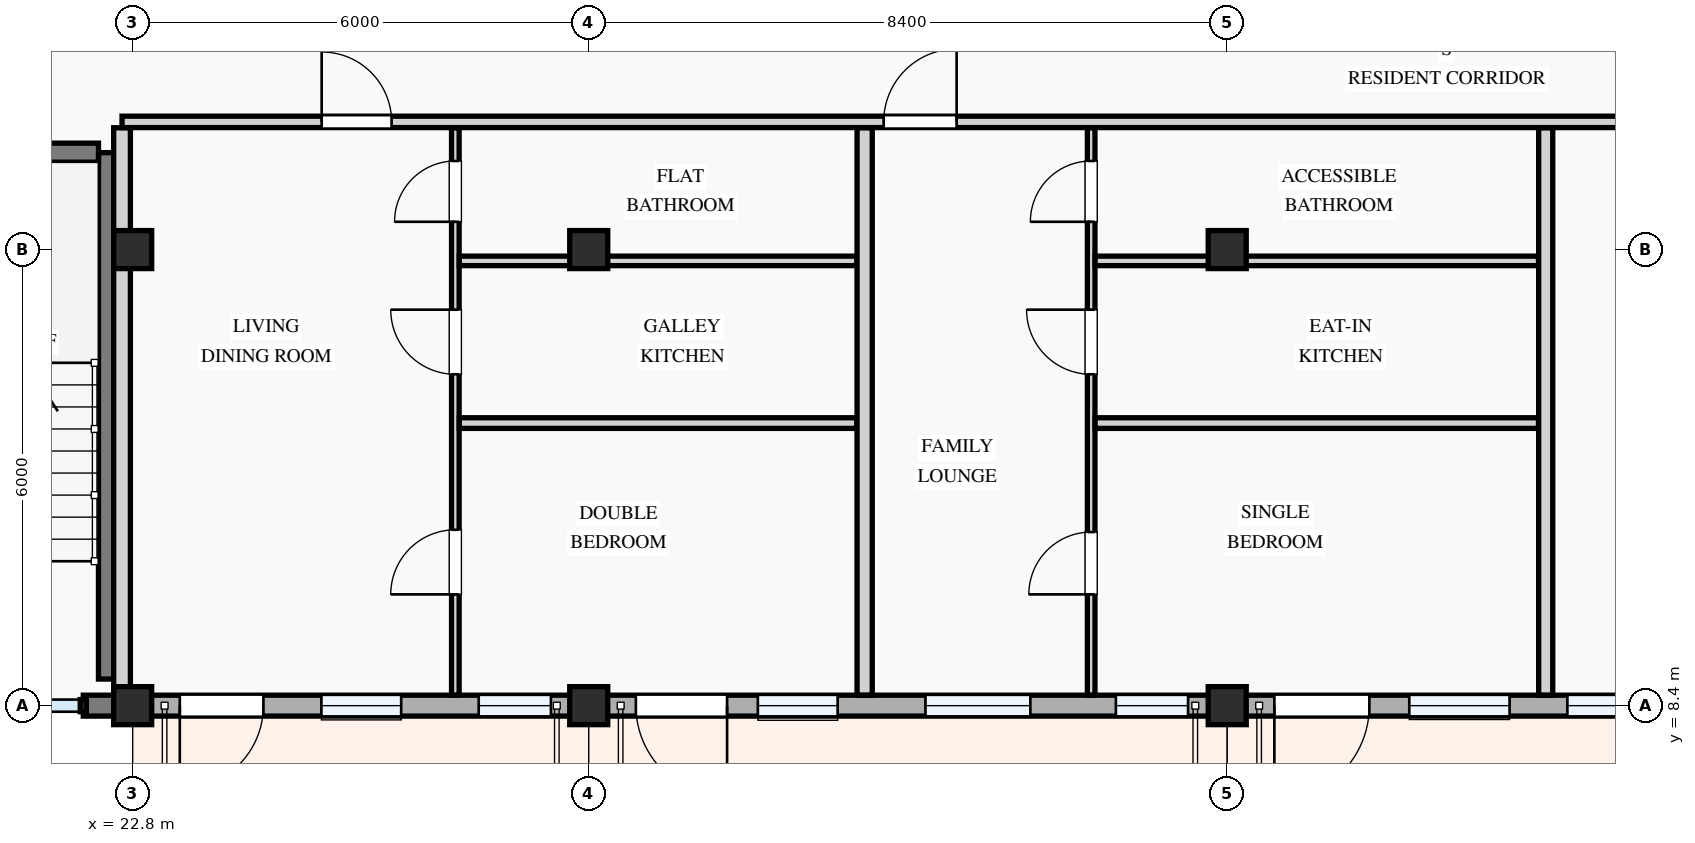
"""IFC4 building model, lengths in metres.
Left out: names, types, materials, properties, quantities, classifications, styles, units other than length and angle.
Written with IfcOpenShell. Run it as: python <this file> out.ifc"""

import sys

from ifc_helpers import new_model, si_unit, direction, frame, frame_2d, origin, origin_2d, place, context, subcontext, project, spatial, rectangle, extrude, element, fill, save


model = new_model("IFC4")
c1 = context("Model", 3, precision=1e-05, world=origin(), true_north=direction((0.0, 1.0)))
c2 = subcontext(c1, "Body", "Model", "MODEL_VIEW")
j1 = project(units=[si_unit("LENGTHUNIT", "METRE"), si_unit("PLANEANGLEUNIT", "RADIAN")], contexts=[c1])
p1 = place(None, origin())
s1 = spatial("IfcSite", under=j1, at=p1, CompositionType="ELEMENT")
p2 = place(p1, origin())
s2 = spatial("IfcBuilding", under=s1, at=p2, CompositionType="ELEMENT")
p3 = place(p2, frame((0.0, 0.0, 24.6)))
s3 = spatial("IfcBuildingStorey", under=s2, at=p3, CompositionType="ELEMENT", Elevation=24.6)
for number, where, z_axis, x_axis in (
    (1, (22.8, 8.4, 0.0), (0.0, 0.0, 1.0), (1.0, 0.0, 0.0)),
    (2, (22.8, 14.4, 0.0), (0.0, 0.0, 1.0), (1.0, 0.0, 0.0)),
    (3, (28.8, 8.4, 0.0), (0.0, 0.0, 1.0), (1.0, 0.0, 0.0)),
    (4, (28.8, 14.4, 0.0), (0.0, 0.0, 1.0), (1.0, 0.0, 0.0)),
    (5, (37.2, 8.4, 0.0), (0.0, 0.0, 1.0), (1.0, 0.0, 0.0)),
    (6, (37.2, 14.4, 0.0), (0.0, 0.0, 1.0), (1.0, 0.0, 0.0)),
):
    element("IfcColumn", number, at=place(p3, frame(where, z_axis=z_axis, x_axis=x_axis)), inside=s3, PredefinedType="COLUMN", context=c2, shape_type="SweptSolid", body=[
        extrude(rectangle(XDim=0.5, YDim=0.5, at=origin_2d()), origin(), (0.0, 0.0, 1.0), 3.3),
    ])
p4 = place(p3, frame((22.15, 8.4, 0.0), z_axis=(0.0, 0.0, 1.0), x_axis=(1.0, 0.0, 0.0)))
e7 = element("IfcWall", 7, at=p4, inside=s3, PredefinedType="STANDARD", context=c2, shape_type="SweptSolid", body=[
    extrude(rectangle(XDim=0.65, YDim=0.275, at=frame_2d((0.325, 0.0))), origin(), (0.0, 0.0, 1.0), 3.04),
])
p5 = place(p3, frame((22.8, 8.4, 0.0), z_axis=(0.0, 0.0, 1.0), x_axis=(1.0, 0.0, 0.0)))
e8 = element("IfcWall", 8, at=p5, inside=s3, PredefinedType="STANDARD", context=c2, shape_type="SweptSolid", body=[
    extrude(rectangle(XDim=6.0, YDim=0.275, at=frame_2d((3.0, 0.0))), origin(), (0.0, 0.0, 1.0), 2.475),
])
p6 = place(p5, frame((0.62, 0.0, 0.0)))
e9 = element("IfcOpeningElement", 9, at=p6, cuts=e8, PredefinedType="OPENING", context=c2, shape_type="SweptSolid", body=[
    extrude(rectangle(XDim=1.1, YDim=2.15, at=frame_2d((0.55, 1.075))), frame((0.0, 0.147, 0.0), z_axis=(0.0, -1.0, 0.0), x_axis=(1.0, 0.0, 0.0)), (0.0, 0.0, 1.0), 0.295),
])
p7 = place(p5, frame((2.482, 0.0, 0.78)))
e10 = element("IfcOpeningElement", 10, at=p7, cuts=e8, PredefinedType="OPENING", context=c2, shape_type="SweptSolid", body=[
    extrude(rectangle(XDim=1.05, YDim=1.2, at=frame_2d((0.525, 0.6))), frame((0.0, 0.147, 0.0), z_axis=(0.0, -1.0, 0.0), x_axis=(1.0, 0.0, 0.0)), (0.0, 0.0, 1.0), 0.295),
])
p8 = place(p5, frame((4.552, 0.0, 0.78)))
e11 = element("IfcOpeningElement", 11, at=p8, cuts=e8, PredefinedType="OPENING", context=c2, shape_type="SweptSolid", body=[
    extrude(rectangle(XDim=0.95, YDim=1.15, at=frame_2d((0.475, 0.575))), frame((0.0, 0.147, 0.0), z_axis=(0.0, -1.0, 0.0), x_axis=(1.0, 0.0, 0.0)), (0.0, 0.0, 1.0), 0.295),
])
p9 = place(p3, frame((28.8, 8.4, 0.0), z_axis=(0.0, 0.0, 1.0), x_axis=(1.0, 0.0, 0.0)))
e12 = element("IfcWall", 12, at=p9, inside=s3, PredefinedType="STANDARD", context=c2, shape_type="SweptSolid", body=[
    extrude(rectangle(XDim=8.4, YDim=0.275, at=frame_2d((4.2, 0.0))), origin(), (0.0, 0.0, 1.0), 2.375),
])
p10 = place(p9, frame((0.62, 0.0, 0.0)))
e13 = element("IfcOpeningElement", 13, at=p10, cuts=e12, PredefinedType="OPENING", context=c2, shape_type="SweptSolid", body=[
    extrude(rectangle(XDim=1.2, YDim=2.15, at=frame_2d((0.6, 1.075))), frame((0.0, 0.147, 0.0), z_axis=(0.0, -1.0, 0.0), x_axis=(1.0, 0.0, 0.0)), (0.0, 0.0, 1.0), 0.295),
])
p11 = place(p9, frame((2.225, 0.0, 0.78)))
e14 = element("IfcOpeningElement", 14, at=p11, cuts=e12, PredefinedType="OPENING", context=c2, shape_type="SweptSolid", body=[
    extrude(rectangle(XDim=1.05, YDim=1.2, at=frame_2d((0.525, 0.6))), frame((0.0, 0.147, 0.0), z_axis=(0.0, -1.0, 0.0), x_axis=(1.0, 0.0, 0.0)), (0.0, 0.0, 1.0), 0.295),
])
p12 = place(p9, frame((4.43, 0.0, 0.78)))
e15 = element("IfcOpeningElement", 15, at=p12, cuts=e12, PredefinedType="OPENING", context=c2, shape_type="SweptSolid", body=[
    extrude(rectangle(XDim=1.38, YDim=1.48, at=frame_2d((0.69, 0.74))), frame((0.0, 0.147, 0.0), z_axis=(0.0, -1.0, 0.0), x_axis=(1.0, 0.0, 0.0)), (0.0, 0.0, 1.0), 0.295),
])
p13 = place(p9, frame((6.935, 0.0, 0.78)))
e16 = element("IfcOpeningElement", 16, at=p13, cuts=e12, PredefinedType="OPENING", context=c2, shape_type="SweptSolid", body=[
    extrude(rectangle(XDim=0.95, YDim=1.15, at=frame_2d((0.475, 0.575))), frame((0.0, 0.147, 0.0), z_axis=(0.0, -1.0, 0.0), x_axis=(1.0, 0.0, 0.0)), (0.0, 0.0, 1.0), 0.295),
])
p14 = place(p3, frame((37.2, 8.4, 0.0), z_axis=(0.0, 0.0, 1.0), x_axis=(1.0, 0.0, 0.0)))
e17 = element("IfcWall", 17, at=p14, inside=s3, PredefinedType="STANDARD", context=c2, shape_type="SweptSolid", body=[
    extrude(rectangle(XDim=6.0, YDim=0.275, at=frame_2d((3.0, 0.0))), origin(), (0.0, 0.0, 1.0), 2.475),
])
p15 = place(p14, frame((0.62, 0.0, 0.0)))
e18 = element("IfcOpeningElement", 18, at=p15, cuts=e17, PredefinedType="OPENING", context=c2, shape_type="SweptSolid", body=[
    extrude(rectangle(XDim=1.25, YDim=2.2, at=frame_2d((0.625, 1.1))), frame((0.0, 0.147, 0.0), z_axis=(0.0, -1.0, 0.0), x_axis=(1.0, 0.0, 0.0)), (0.0, 0.0, 1.0), 0.295),
])
p16 = place(p14, frame((2.395, 0.0, 0.78)))
e19 = element("IfcOpeningElement", 19, at=p16, cuts=e17, PredefinedType="OPENING", context=c2, shape_type="SweptSolid", body=[
    extrude(rectangle(XDim=1.32, YDim=1.35, at=frame_2d((0.66, 0.675))), frame((0.0, 0.147, 0.0), z_axis=(0.0, -1.0, 0.0), x_axis=(1.0, 0.0, 0.0)), (0.0, 0.0, 1.0), 0.295),
])
p17 = place(p14, frame((4.475, 0.0, 0.78)))
e20 = element("IfcOpeningElement", 20, at=p17, cuts=e17, PredefinedType="OPENING", context=c2, shape_type="SweptSolid", body=[
    extrude(rectangle(XDim=1.05, YDim=1.2, at=frame_2d((0.525, 0.6))), frame((0.0, 0.147, 0.0), z_axis=(0.0, -1.0, 0.0), x_axis=(1.0, 0.0, 0.0)), (0.0, 0.0, 1.0), 0.295),
])
p18 = place(p3, frame((22.475, 8.75, 0.0), z_axis=(0.0, 0.0, 1.0), x_axis=(0.0, 1.0, 0.0)))
e21 = element("IfcWall", 21, at=p18, inside=s3, PredefinedType="SHEAR", context=c2, shape_type="SweptSolid", body=[
    extrude(rectangle(XDim=6.925, YDim=0.25, at=frame_2d((3.462, 0.0))), origin(), (0.0, 0.0, 1.0), 3.0),
])
p19 = place(p3, frame((8.85, 15.675, 0.0), z_axis=(0.0, 0.0, 1.0), x_axis=(1.0, 0.0, 0.0)))
e22 = element("IfcWall", 22, at=p19, inside=s3, PredefinedType="SHEAR", context=c2, shape_type="SweptSolid", body=[
    extrude(rectangle(XDim=13.5, YDim=0.25, at=frame_2d((6.75, 0.0))), origin(), (0.0, 0.0, 1.0), 3.0),
])
p20 = place(p19, frame((6.2, 0.0, 0.0)))
e23 = element("IfcOpeningElement", 23, at=p20, cuts=e22, PredefinedType="OPENING", context=c2, shape_type="SweptSolid", body=[
    extrude(rectangle(XDim=1.1, YDim=2.15, at=frame_2d((0.55, 1.075))), frame((0.0, 0.135, 0.0), z_axis=(0.0, -1.0, 0.0), x_axis=(1.0, 0.0, 0.0)), (0.0, 0.0, 1.0), 0.27),
])
p21 = place(p3, frame((27.045, 8.54, 0.0), z_axis=(0.0, 0.0, 1.0), x_axis=(0.0, 1.0, 0.0)))
e24 = element("IfcWall", 24, at=p21, inside=s3, PredefinedType="PARTITIONING", context=c2, shape_type="SweptSolid", body=[
    extrude(rectangle(XDim=7.463, YDim=0.1, at=frame_2d((3.732, 0.0))), origin(), (0.0, 0.0, 1.0), 3.0),
])
p22 = place(p21, frame((1.324, 0.0, 0.0)))
e25 = element("IfcOpeningElement", 25, at=p22, cuts=e24, PredefinedType="OPENING", context=c2, shape_type="SweptSolid", body=[
    extrude(rectangle(XDim=0.85, YDim=2.1, at=frame_2d((0.425, 1.05))), frame((0.0, 0.06, 0.0), z_axis=(0.0, -1.0, 0.0), x_axis=(1.0, 0.0, 0.0)), (0.0, 0.0, 1.0), 0.12),
])
p23 = place(p21, frame((4.22, 0.0, 0.0)))
e26 = element("IfcOpeningElement", 26, at=p23, cuts=e24, PredefinedType="OPENING", context=c2, shape_type="SweptSolid", body=[
    extrude(rectangle(XDim=0.85, YDim=2.1, at=frame_2d((0.425, 1.05))), frame((0.0, 0.06, 0.0), z_axis=(0.0, -1.0, 0.0), x_axis=(1.0, 0.0, 0.0)), (0.0, 0.0, 1.0), 0.12),
])
p24 = place(p21, frame((6.226, 0.0, 0.0)))
e27 = element("IfcOpeningElement", 27, at=p24, cuts=e24, PredefinedType="OPENING", context=c2, shape_type="SweptSolid", body=[
    extrude(rectangle(XDim=0.8, YDim=2.1, at=frame_2d((0.4, 1.05))), frame((0.0, 0.06, 0.0), z_axis=(0.0, -1.0, 0.0), x_axis=(1.0, 0.0, 0.0)), (0.0, 0.0, 1.0), 0.12),
])
p25 = place(p3, frame((27.097, 12.118, 0.0), z_axis=(0.0, 0.0, 1.0), x_axis=(1.0, 0.0, 0.0)))
e28 = element("IfcWall", 28, at=p25, inside=s3, PredefinedType="PARTITIONING", context=c2, shape_type="SweptSolid", body=[
    extrude(rectangle(XDim=5.231, YDim=0.14, at=frame_2d((2.615, 0.0))), origin(), (0.0, 0.0, 1.0), 3.0),
])
p26 = place(p3, frame((27.097, 14.251, 0.0), z_axis=(0.0, 0.0, 1.0), x_axis=(1.0, 0.0, 0.0)))
e29 = element("IfcWall", 29, at=p26, inside=s3, PredefinedType="PARTITIONING", context=c2, shape_type="SweptSolid", body=[
    extrude(rectangle(XDim=5.231, YDim=0.125, at=frame_2d((2.615, 0.0))), origin(), (0.0, 0.0, 1.0), 2.375),
])
p27 = place(p3, frame((22.66, 8.54, 0.0), z_axis=(0.0, 0.0, 1.0), x_axis=(0.0, 1.0, 0.0)))
e30 = element("IfcWall", 30, at=p27, inside=s3, PredefinedType="PARTITIONING", context=c2, shape_type="SweptSolid", body=[
    extrude(rectangle(XDim=7.463, YDim=0.22, at=frame_2d((3.732, 0.0))), origin(), (0.0, 0.0, 1.0), 2.425),
])
p28 = place(p3, frame((35.41, 8.54, 0.0), z_axis=(0.0, 0.0, 1.0), x_axis=(0.0, 1.0, 0.0)))
e31 = element("IfcWall", 31, at=p28, inside=s3, PredefinedType="PARTITIONING", context=c2, shape_type="SweptSolid", body=[
    extrude(rectangle(XDim=7.463, YDim=0.1, at=frame_2d((3.732, 0.0))), origin(), (0.0, 0.0, 1.0), 3.0),
])
p29 = place(p28, frame((1.324, 0.0, 0.0)))
e32 = element("IfcOpeningElement", 32, at=p29, cuts=e31, PredefinedType="OPENING", context=c2, shape_type="SweptSolid", body=[
    extrude(rectangle(XDim=0.82, YDim=2.08, at=frame_2d((0.41, 1.04))), frame((0.0, 0.06, 0.0), z_axis=(0.0, -1.0, 0.0), x_axis=(1.0, 0.0, 0.0)), (0.0, 0.0, 1.0), 0.12),
])
p30 = place(p28, frame((4.22, 0.0, 0.0)))
e33 = element("IfcOpeningElement", 33, at=p30, cuts=e31, PredefinedType="OPENING", context=c2, shape_type="SweptSolid", body=[
    extrude(rectangle(XDim=0.85, YDim=2.1, at=frame_2d((0.425, 1.05))), frame((0.0, 0.06, 0.0), z_axis=(0.0, -1.0, 0.0), x_axis=(1.0, 0.0, 0.0)), (0.0, 0.0, 1.0), 0.12),
])
p31 = place(p28, frame((6.226, 0.0, 0.0)))
e34 = element("IfcOpeningElement", 34, at=p31, cuts=e31, PredefinedType="OPENING", context=c2, shape_type="SweptSolid", body=[
    extrude(rectangle(XDim=0.8, YDim=2.1, at=frame_2d((0.4, 1.05))), frame((0.0, 0.06, 0.0), z_axis=(0.0, -1.0, 0.0), x_axis=(1.0, 0.0, 0.0)), (0.0, 0.0, 1.0), 0.12),
])
p32 = place(p3, frame((35.462, 12.118, 0.0), z_axis=(0.0, 0.0, 1.0), x_axis=(1.0, 0.0, 0.0)))
e35 = element("IfcWall", 35, at=p32, inside=s3, PredefinedType="PARTITIONING", context=c2, shape_type="SweptSolid", body=[
    extrude(rectangle(XDim=5.833, YDim=0.14, at=frame_2d((2.917, 0.0))), origin(), (0.0, 0.0, 1.0), 3.0),
])
p33 = place(p3, frame((35.462, 14.251, 0.0), z_axis=(0.0, 0.0, 1.0), x_axis=(1.0, 0.0, 0.0)))
e36 = element("IfcWall", 36, at=p33, inside=s3, PredefinedType="PARTITIONING", context=c2, shape_type="SweptSolid", body=[
    extrude(rectangle(XDim=5.833, YDim=0.125, at=frame_2d((2.917, 0.0))), origin(), (0.0, 0.0, 1.0), 2.375),
])
p34 = place(p3, frame((32.43, 8.54, 0.0), z_axis=(0.0, 0.0, 1.0), x_axis=(0.0, 1.0, 0.0)))
e37 = element("IfcWall", 37, at=p34, inside=s3, PredefinedType="PARTITIONING", context=c2, shape_type="SweptSolid", body=[
    extrude(rectangle(XDim=7.463, YDim=0.2, at=frame_2d((3.732, 0.0))), origin(), (0.0, 0.0, 1.0), 3.0),
])
p35 = place(p3, frame((41.39, 8.54, 0.0), z_axis=(0.0, 0.0, 1.0), x_axis=(0.0, 1.0, 0.0)))
e38 = element("IfcWall", 38, at=p35, inside=s3, PredefinedType="PARTITIONING", context=c2, shape_type="SweptSolid", body=[
    extrude(rectangle(XDim=7.463, YDim=0.185, at=frame_2d((3.732, 0.0))), origin(), (0.0, 0.0, 1.0), 3.0),
])
p36 = place(p3, frame((22.66, 16.08, 0.0), z_axis=(0.0, 0.0, 1.0), x_axis=(1.0, 0.0, 0.0)))
e39 = element("IfcWall", 39, at=p36, inside=s3, PredefinedType="PARTITIONING", context=c2, shape_type="SweptSolid", body=[
    extrude(rectangle(XDim=34.88, YDim=0.15, at=frame_2d((17.44, 0.0))), origin(), (0.0, 0.0, 1.0), 3.0),
])
p37 = place(p36, frame((2.627, 0.0, 0.0)))
e40 = element("IfcOpeningElement", 40, at=p37, cuts=e39, PredefinedType="OPENING", context=c2, shape_type="SweptSolid", body=[
    extrude(rectangle(XDim=0.92, YDim=2.1, at=frame_2d((0.46, 1.05))), frame((0.0, 0.085, 0.0), z_axis=(0.0, -1.0, 0.0), x_axis=(1.0, 0.0, 0.0)), (0.0, 0.0, 1.0), 0.17),
])
p38 = place(p36, frame((10.02, 0.0, 0.0)))
e41 = element("IfcOpeningElement", 41, at=p38, cuts=e39, PredefinedType="OPENING", context=c2, shape_type="SweptSolid", body=[
    extrude(rectangle(XDim=0.96, YDim=2.12, at=frame_2d((0.48, 1.06))), frame((0.0, 0.085, 0.0), z_axis=(0.0, -1.0, 0.0), x_axis=(1.0, 0.0, 0.0)), (0.0, 0.0, 1.0), 0.17),
])
p39 = place(p36, frame((24.355, 0.0, 0.0)))
e42 = element("IfcOpeningElement", 42, at=p39, cuts=e39, PredefinedType="OPENING", context=c2, shape_type="SweptSolid", body=[
    extrude(rectangle(XDim=0.92, YDim=2.1, at=frame_2d((0.46, 1.05))), frame((0.0, 0.085, 0.0), z_axis=(0.0, -1.0, 0.0), x_axis=(1.0, 0.0, 0.0)), (0.0, 0.0, 1.0), 0.17),
])
p40 = place(p6, frame((1.1, 0.0, 0.0), z_axis=(0.0, 0.0, 1.0), x_axis=(-1.0, 0.0, 0.0)))
e43 = element("IfcDoor", 43, at=p40, inside=s3, OperationType="SINGLE_SWING_RIGHT", PredefinedType="DOOR", context=c2, shape_type="SweptSolid", body=[
    extrude(rectangle(XDim=1.1, YDim=2.15, at=frame_2d((0.55, 1.075))), frame((0.0, 0.025, 0.0), z_axis=(0.0, -1.0, 0.0), x_axis=(1.0, 0.0, 0.0)), (0.0, 0.0, 1.0), 0.05),
])
fill(e9, e43)
p41 = place(p7, origin())
e44 = element("IfcWindow", 44, at=p41, inside=s3, PartitioningType="SINGLE_PANEL", PredefinedType="WINDOW", context=c2, shape_type="SweptSolid", body=[
    extrude(rectangle(XDim=1.05, YDim=1.2, at=frame_2d((0.525, 0.6))), frame((0.0, 0.03, 0.0), z_axis=(0.0, -1.0, 0.0), x_axis=(1.0, 0.0, 0.0)), (0.0, 0.0, 1.0), 0.06),
])
fill(e10, e44)
p42 = place(p8, origin())
e45 = element("IfcWindow", 45, at=p42, inside=s3, PartitioningType="SINGLE_PANEL", PredefinedType="WINDOW", context=c2, shape_type="SweptSolid", body=[
    extrude(rectangle(XDim=0.95, YDim=1.15, at=frame_2d((0.475, 0.575))), frame((0.0, 0.03, 0.0), z_axis=(0.0, -1.0, 0.0), x_axis=(1.0, 0.0, 0.0)), (0.0, 0.0, 1.0), 0.06),
])
fill(e11, e45)
p43 = place(p10, frame((1.2, 0.0, 0.0), z_axis=(0.0, 0.0, 1.0), x_axis=(-1.0, 0.0, 0.0)))
e46 = element("IfcDoor", 46, at=p43, inside=s3, OperationType="SINGLE_SWING_LEFT", PredefinedType="DOOR", context=c2, shape_type="SweptSolid", body=[
    extrude(rectangle(XDim=1.2, YDim=2.15, at=frame_2d((0.6, 1.075))), frame((0.0, 0.025, 0.0), z_axis=(0.0, -1.0, 0.0), x_axis=(1.0, 0.0, 0.0)), (0.0, 0.0, 1.0), 0.05),
])
fill(e13, e46)
p44 = place(p11, origin())
e47 = element("IfcWindow", 47, at=p44, inside=s3, PartitioningType="SINGLE_PANEL", PredefinedType="WINDOW", context=c2, shape_type="SweptSolid", body=[
    extrude(rectangle(XDim=1.05, YDim=1.2, at=frame_2d((0.525, 0.6))), frame((0.0, 0.03, 0.0), z_axis=(0.0, -1.0, 0.0), x_axis=(1.0, 0.0, 0.0)), (0.0, 0.0, 1.0), 0.06),
])
fill(e14, e47)
p45 = place(p12, origin())
e48 = element("IfcWindow", 48, at=p45, inside=s3, PartitioningType="SINGLE_PANEL", PredefinedType="WINDOW", context=c2, shape_type="SweptSolid", body=[
    extrude(rectangle(XDim=1.38, YDim=1.48, at=frame_2d((0.69, 0.74))), frame((0.0, 0.03, 0.0), z_axis=(0.0, -1.0, 0.0), x_axis=(1.0, 0.0, 0.0)), (0.0, 0.0, 1.0), 0.06),
])
fill(e15, e48)
p46 = place(p13, origin())
e49 = element("IfcWindow", 49, at=p46, inside=s3, PartitioningType="SINGLE_PANEL", PredefinedType="WINDOW", context=c2, shape_type="SweptSolid", body=[
    extrude(rectangle(XDim=0.95, YDim=1.15, at=frame_2d((0.475, 0.575))), frame((0.0, 0.03, 0.0), z_axis=(0.0, -1.0, 0.0), x_axis=(1.0, 0.0, 0.0)), (0.0, 0.0, 1.0), 0.06),
])
fill(e16, e49)
p47 = place(p15, frame((1.25, 0.0, 0.0), z_axis=(0.0, 0.0, 1.0), x_axis=(-1.0, 0.0, 0.0)))
e50 = element("IfcDoor", 50, at=p47, inside=s3, OperationType="SINGLE_SWING_RIGHT", PredefinedType="DOOR", context=c2, shape_type="SweptSolid", body=[
    extrude(rectangle(XDim=1.25, YDim=2.2, at=frame_2d((0.625, 1.1))), frame((0.0, 0.025, 0.0), z_axis=(0.0, -1.0, 0.0), x_axis=(1.0, 0.0, 0.0)), (0.0, 0.0, 1.0), 0.05),
])
fill(e18, e50)
p48 = place(p16, origin())
e51 = element("IfcWindow", 51, at=p48, inside=s3, PartitioningType="SINGLE_PANEL", PredefinedType="WINDOW", context=c2, shape_type="SweptSolid", body=[
    extrude(rectangle(XDim=1.32, YDim=1.35, at=frame_2d((0.66, 0.675))), frame((0.0, 0.03, 0.0), z_axis=(0.0, -1.0, 0.0), x_axis=(1.0, 0.0, 0.0)), (0.0, 0.0, 1.0), 0.06),
])
fill(e19, e51)
p49 = place(p17, origin())
e52 = element("IfcWindow", 52, at=p49, inside=s3, PartitioningType="SINGLE_PANEL", PredefinedType="WINDOW", context=c2, shape_type="SweptSolid", body=[
    extrude(rectangle(XDim=1.05, YDim=1.2, at=frame_2d((0.525, 0.6))), frame((0.0, 0.03, 0.0), z_axis=(0.0, -1.0, 0.0), x_axis=(1.0, 0.0, 0.0)), (0.0, 0.0, 1.0), 0.06),
])
fill(e20, e52)
p50 = place(p22, origin())
e53 = element("IfcDoor", 53, at=p50, inside=s3, OperationType="SINGLE_SWING_LEFT", PredefinedType="DOOR", context=c2, shape_type="SweptSolid", body=[
    extrude(rectangle(XDim=0.85, YDim=2.1, at=frame_2d((0.425, 1.05))), frame((0.0, 0.025, 0.0), z_axis=(0.0, -1.0, 0.0), x_axis=(1.0, 0.0, 0.0)), (0.0, 0.0, 1.0), 0.05),
])
fill(e25, e53)
p51 = place(p23, origin())
e54 = element("IfcDoor", 54, at=p51, inside=s3, OperationType="SINGLE_SWING_RIGHT", PredefinedType="DOOR", context=c2, shape_type="SweptSolid", body=[
    extrude(rectangle(XDim=0.85, YDim=2.1, at=frame_2d((0.425, 1.05))), frame((0.0, 0.025, 0.0), z_axis=(0.0, -1.0, 0.0), x_axis=(1.0, 0.0, 0.0)), (0.0, 0.0, 1.0), 0.05),
])
fill(e26, e54)
p52 = place(p24, origin())
e55 = element("IfcDoor", 55, at=p52, inside=s3, OperationType="SINGLE_SWING_LEFT", PredefinedType="DOOR", context=c2, shape_type="SweptSolid", body=[
    extrude(rectangle(XDim=0.8, YDim=2.1, at=frame_2d((0.4, 1.05))), frame((0.0, 0.025, 0.0), z_axis=(0.0, -1.0, 0.0), x_axis=(1.0, 0.0, 0.0)), (0.0, 0.0, 1.0), 0.05),
])
fill(e27, e55)
p53 = place(p29, origin())
e56 = element("IfcDoor", 56, at=p53, inside=s3, OperationType="SINGLE_SWING_LEFT", PredefinedType="DOOR", context=c2, shape_type="SweptSolid", body=[
    extrude(rectangle(XDim=0.82, YDim=2.08, at=frame_2d((0.41, 1.04))), frame((0.0, 0.025, 0.0), z_axis=(0.0, -1.0, 0.0), x_axis=(1.0, 0.0, 0.0)), (0.0, 0.0, 1.0), 0.05),
])
fill(e32, e56)
p54 = place(p30, origin())
e57 = element("IfcDoor", 57, at=p54, inside=s3, OperationType="SINGLE_SWING_RIGHT", PredefinedType="DOOR", context=c2, shape_type="SweptSolid", body=[
    extrude(rectangle(XDim=0.85, YDim=2.1, at=frame_2d((0.425, 1.05))), frame((0.0, 0.025, 0.0), z_axis=(0.0, -1.0, 0.0), x_axis=(1.0, 0.0, 0.0)), (0.0, 0.0, 1.0), 0.05),
])
fill(e33, e57)
p55 = place(p31, origin())
e58 = element("IfcDoor", 58, at=p55, inside=s3, OperationType="SINGLE_SWING_LEFT", PredefinedType="DOOR", context=c2, shape_type="SweptSolid", body=[
    extrude(rectangle(XDim=0.8, YDim=2.1, at=frame_2d((0.4, 1.05))), frame((0.0, 0.025, 0.0), z_axis=(0.0, -1.0, 0.0), x_axis=(1.0, 0.0, 0.0)), (0.0, 0.0, 1.0), 0.05),
])
fill(e34, e58)
p56 = place(p37, origin())
e59 = element("IfcDoor", 59, at=p56, inside=s3, OperationType="SINGLE_SWING_LEFT", PredefinedType="DOOR", context=c2, shape_type="SweptSolid", body=[
    extrude(rectangle(XDim=0.92, YDim=2.1, at=frame_2d((0.46, 1.05))), frame((0.0, 0.025, 0.0), z_axis=(0.0, -1.0, 0.0), x_axis=(1.0, 0.0, 0.0)), (0.0, 0.0, 1.0), 0.05),
])
fill(e40, e59)
p57 = place(p38, origin())
e60 = element("IfcDoor", 60, at=p57, inside=s3, OperationType="SINGLE_SWING_RIGHT", PredefinedType="DOOR", context=c2, shape_type="SweptSolid", body=[
    extrude(rectangle(XDim=0.96, YDim=2.12, at=frame_2d((0.48, 1.06))), frame((0.0, 0.025, 0.0), z_axis=(0.0, -1.0, 0.0), x_axis=(1.0, 0.0, 0.0)), (0.0, 0.0, 1.0), 0.05),
])
fill(e41, e60)
save(model, sys.argv[1])
